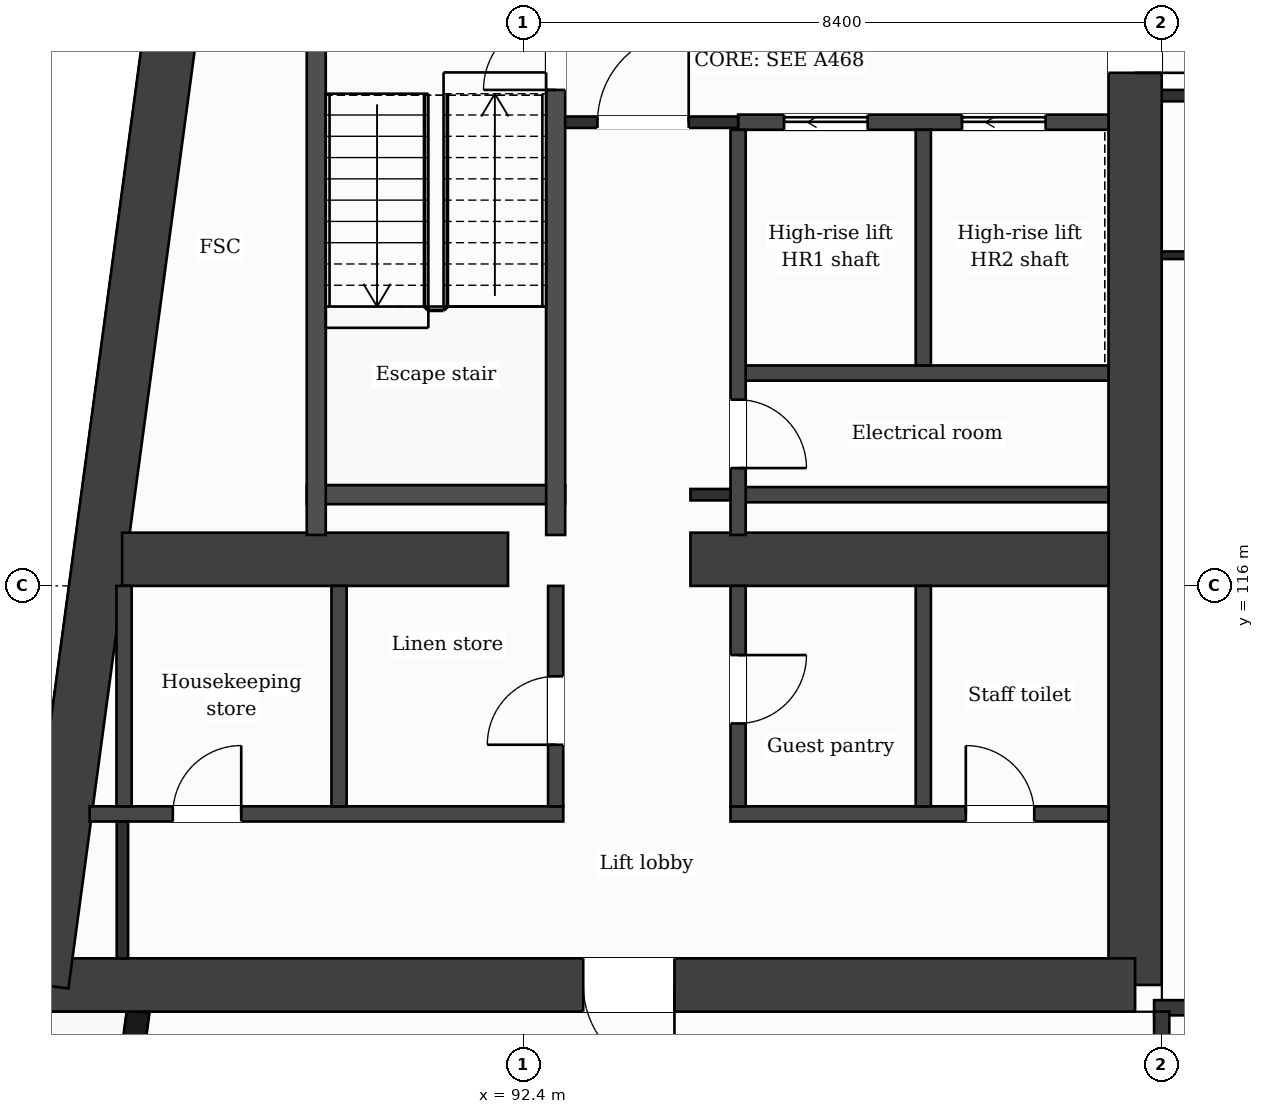
"""IFC4 building model, lengths in metres.
Left out: names, types, materials, properties, quantities, classifications, styles, units other than length and angle.
Written with IfcOpenShell. Run it as: python <this file> out.ifc"""

import sys

from ifc_helpers import new_model, si_unit, direction, frame, frame_2d, origin, place, context, subcontext, project, spatial, rectangle, extrude, element, fill, save


model = new_model("IFC4")
c1 = context("Model", 3, precision=1e-05, world=origin(), true_north=direction((0.0, 1.0)))
c2 = subcontext(c1, "Body", "Model", "MODEL_VIEW")
j1 = project(units=[si_unit("LENGTHUNIT", "METRE"), si_unit("PLANEANGLEUNIT", "RADIAN")], contexts=[c1])
p1 = place(None, origin())
s1 = spatial("IfcSite", under=j1, at=p1, CompositionType="ELEMENT")
p2 = place(p1, origin())
s2 = spatial("IfcBuilding", under=s1, at=p2, CompositionType="ELEMENT")
p3 = place(p2, frame((0.0, 0.0, 277.5)))
s3 = spatial("IfcBuildingStorey", under=s2, at=p3, CompositionType="ELEMENT", Elevation=277.5)
p4 = place(p3, frame((100.45, 132.05, 0.0), z_axis=(0.0, 0.0, 1.0), x_axis=(0.0, -1.0, 0.0)))
e1 = element("IfcWall", 1, at=p4, inside=s3, PredefinedType="SHEAR", context=c2, shape_type="SweptSolid", body=[
    extrude(rectangle(XDim=21.3, YDim=0.7, at=frame_2d((10.65, 0.0))), origin(), (0.0, 0.0, 1.0), 3.7),
])
p5 = place(p4, frame((7.9, 0.0, 0.0)))
e2 = element("IfcOpeningElement", 2, at=p5, cuts=e1, PredefinedType="OPENING", context=c2, shape_type="SweptSolid", body=[
    extrude(rectangle(XDim=1.4, YDim=2.1, at=frame_2d((0.7, 1.05))), frame((0.0, 0.36, 0.0), z_axis=(0.0, -1.0, 0.0), x_axis=(1.0, 0.0, 0.0)), (0.0, 0.0, 1.0), 0.72),
])
p6 = place(p3, frame((100.45, 110.75, 0.0), z_axis=(0.0, 0.0, 1.0), x_axis=(-1.0, 0.0, 0.0)))
e3 = element("IfcWall", 3, at=p6, inside=s3, PredefinedType="SHEAR", context=c2, shape_type="SweptSolid", body=[
    extrude(rectangle(XDim=14.38, YDim=0.7, at=frame_2d((7.19, 0.0))), origin(), (0.0, 0.0, 1.0), 3.7),
])
p7 = place(p6, frame((6.06, 0.0, 0.0)))
e4 = element("IfcOpeningElement", 4, at=p7, cuts=e3, PredefinedType="OPENING", context=c2, shape_type="SweptSolid", body=[
    extrude(rectangle(XDim=1.2, YDim=2.1, at=frame_2d((0.6, 1.05))), frame((0.0, 0.36, 0.0), z_axis=(0.0, -1.0, 0.0), x_axis=(1.0, 0.0, 0.0)), (0.0, 0.0, 1.0), 0.72),
])
p8 = place(p3, frame((86.07, 110.75, 0.0), z_axis=(0.0, 0.0, 1.0), x_axis=(0.133406218907, 0.991061441464, 0.0)))
e5 = element("IfcWall", 5, at=p8, inside=s3, PredefinedType="SHEAR", context=c2, shape_type="SweptSolid", body=[
    extrude(rectangle(XDim=21.492, YDim=0.7, at=frame_2d((10.746, 0.0))), origin(), (0.0, 0.0, 1.0), 3.7),
])
p9 = place(p3, frame((87.123, 116.35, 0.0), z_axis=(0.0, 0.0, 1.0), x_axis=(1.0, 0.0, 0.0)))
e6 = element("IfcWall", 6, at=p9, inside=s3, PredefinedType="SHEAR", context=c2, shape_type="SweptSolid", body=[
    extrude(rectangle(XDim=5.077, YDim=0.7, at=frame_2d((2.539, 0.0))), origin(), (0.0, 0.0, 1.0), 3.7),
])
p10 = place(p3, frame((94.6, 116.35, 0.0), z_axis=(0.0, 0.0, 1.0), x_axis=(1.0, 0.0, 0.0)))
e7 = element("IfcWall", 7, at=p10, inside=s3, PredefinedType="SHEAR", context=c2, shape_type="SweptSolid", body=[
    extrude(rectangle(XDim=5.5, YDim=0.7, at=frame_2d((2.75, 0.0))), origin(), (0.0, 0.0, 1.0), 3.7),
])
p11 = place(p3, frame((87.334, 110.4, 0.0), z_axis=(0.0, 0.0, 1.0), x_axis=(-0.13345962011, -0.991054251694, 0.0)))
e8 = element("IfcWall", 8, at=p11, inside=s3, PredefinedType="SOLIDWALL", context=c2, shape_type="SweptSolid", body=[
    extrude(rectangle(XDim=1.937, YDim=0.3, at=frame_2d((0.969, 0.0))), origin(), (0.0, 0.0, 1.0), 3.38),
])
p12 = place(p3, frame((100.7, 110.45, 0.0), z_axis=(0.0, 0.0, 1.0), x_axis=(1.0, 0.0, 0.0)))
e9 = element("IfcWall", 9, at=p12, inside=s3, PredefinedType="PARTITIONING", context=c2, shape_type="SweptSolid", body=[
    extrude(rectangle(XDim=25.4, YDim=0.2, at=frame_2d((12.7, 0.0))), origin(), (0.0, 0.0, 1.0), 3.38),
])
p13 = place(p3, frame((86.696, 113.0, 0.0), z_axis=(0.0, 0.0, 1.0), x_axis=(1.0, 0.0, 0.0)))
e10 = element("IfcWall", 10, at=p13, inside=s3, PredefinedType="PARTITIONING", context=c2, shape_type="SweptSolid", body=[
    extrude(rectangle(XDim=6.231, YDim=0.2, at=frame_2d((3.116, 0.0))), origin(), (0.0, 0.0, 1.0), 3.38),
])
p14 = place(p13, frame((1.094, 0.0, 0.0)))
e11 = element("IfcOpeningElement", 11, at=p14, cuts=e10, PredefinedType="OPENING", context=c2, shape_type="SweptSolid", body=[
    extrude(rectangle(XDim=0.9, YDim=2.1, at=frame_2d((0.45, 1.05))), frame((0.0, 0.11, 0.0), z_axis=(0.0, -1.0, 0.0), x_axis=(1.0, 0.0, 0.0)), (0.0, 0.0, 1.0), 0.22),
])
p15 = place(p3, frame((95.127, 113.0, 0.0), z_axis=(0.0, 0.0, 1.0), x_axis=(1.0, 0.0, 0.0)))
e12 = element("IfcWall", 12, at=p15, inside=s3, PredefinedType="PARTITIONING", context=c2, shape_type="SweptSolid", body=[
    extrude(rectangle(XDim=4.973, YDim=0.2, at=frame_2d((2.487, 0.0))), origin(), (0.0, 0.0, 1.0), 3.38),
])
p16 = place(p15, frame((3.096, 0.0, 0.0)))
e13 = element("IfcOpeningElement", 13, at=p16, cuts=e12, PredefinedType="OPENING", context=c2, shape_type="SweptSolid", body=[
    extrude(rectangle(XDim=0.9, YDim=2.1, at=frame_2d((0.45, 1.05))), frame((0.0, 0.11, 0.0), z_axis=(0.0, -1.0, 0.0), x_axis=(1.0, 0.0, 0.0)), (0.0, 0.0, 1.0), 0.22),
])
p17 = place(p3, frame((95.227, 117.2, 0.0), z_axis=(0.0, 0.0, 1.0), x_axis=(1.0, 0.0, 0.0)))
e14 = element("IfcWall", 14, at=p17, inside=s3, PredefinedType="PARTITIONING", context=c2, shape_type="SweptSolid", body=[
    extrude(rectangle(XDim=4.873, YDim=0.2, at=frame_2d((2.437, 0.0))), origin(), (0.0, 0.0, 1.0), 3.38),
])
p18 = place(p3, frame((94.6, 117.2, 0.0), z_axis=(0.0, 0.0, 1.0), x_axis=(1.0, 0.0, 0.0)))
e15 = element("IfcWall", 15, at=p18, inside=s3, PredefinedType="PARTITIONING", context=c2, shape_type="SweptSolid", body=[
    extrude(rectangle(XDim=0.627, YDim=0.15, at=frame_2d((0.313, 0.0))), origin(), (0.0, 0.0, 1.0), 3.38),
])
p19 = place(p3, frame((89.552, 117.2, 0.0), z_axis=(0.0, 0.0, 1.0), x_axis=(1.0, 0.0, 0.0)))
e16 = element("IfcWall", 16, at=p19, inside=s3, PredefinedType="PARTITIONING", context=c2, shape_type="SweptSolid", body=[
    extrude(rectangle(XDim=3.4, YDim=0.25, at=frame_2d((1.7, 0.0))), origin(), (0.0, 0.0, 1.0), 3.38),
])
p20 = place(p3, frame((95.227, 118.8, 0.0), z_axis=(0.0, 0.0, 1.0), x_axis=(1.0, 0.0, 0.0)))
e17 = element("IfcWall", 17, at=p20, inside=s3, PredefinedType="PARTITIONING", context=c2, shape_type="SweptSolid", body=[
    extrude(rectangle(XDim=4.873, YDim=0.2, at=frame_2d((2.437, 0.0))), origin(), (0.0, 0.0, 1.0), 3.38),
])
p21 = place(p3, frame((100.8, 120.35, 0.0), z_axis=(0.0, 0.0, 1.0), x_axis=(1.0, 0.0, 0.0)))
e18 = element("IfcWall", 18, at=p21, inside=s3, PredefinedType="PARTITIONING", context=c2, shape_type="SweptSolid", body=[
    extrude(rectangle(XDim=2.75, YDim=0.1, at=frame_2d((1.375, 0.0))), origin(), (0.0, 0.0, 1.0), 3.38),
])
p22 = place(p21, frame((1.07, 0.0, 0.0)))
e19 = element("IfcOpeningElement", 19, at=p22, cuts=e18, PredefinedType="OPENING", context=c2, shape_type="SweptSolid", body=[
    extrude(rectangle(XDim=0.8, YDim=2.1, at=frame_2d((0.4, 1.05))), frame((0.0, 0.06, 0.0), z_axis=(0.0, -1.0, 0.0), x_axis=(1.0, 0.0, 0.0)), (0.0, 0.0, 1.0), 0.12),
])
p23 = place(p3, frame((95.227, 122.1, 0.0), z_axis=(0.0, 0.0, 1.0), x_axis=(1.0, 0.0, 0.0)))
e20 = element("IfcWall", 20, at=p23, inside=s3, PredefinedType="PARTITIONING", context=c2, shape_type="SweptSolid", body=[
    extrude(rectangle(XDim=4.873, YDim=0.2, at=frame_2d((2.437, 0.0))), origin(), (0.0, 0.0, 1.0), 3.38),
])
p24 = place(p23, frame((0.605, 0.0, 0.0)))
e21 = element("IfcOpeningElement", 21, at=p24, cuts=e20, PredefinedType="OPENING", context=c2, shape_type="SweptSolid", body=[
    extrude(rectangle(XDim=1.1, YDim=2.1, at=frame_2d((0.55, 1.05))), frame((0.0, 0.11, 0.0), z_axis=(0.0, -1.0, 0.0), x_axis=(1.0, 0.0, 0.0)), (0.0, 0.0, 1.0), 0.22),
])
p25 = place(p23, frame((2.946, 0.0, 0.0)))
e22 = element("IfcOpeningElement", 22, at=p25, cuts=e20, PredefinedType="OPENING", context=c2, shape_type="SweptSolid", body=[
    extrude(rectangle(XDim=1.1, YDim=2.1, at=frame_2d((0.55, 1.05))), frame((0.0, 0.11, 0.0), z_axis=(0.0, -1.0, 0.0), x_axis=(1.0, 0.0, 0.0)), (0.0, 0.0, 1.0), 0.22),
])
p26 = place(p3, frame((92.827, 122.1, 0.0), z_axis=(0.0, 0.0, 1.0), x_axis=(1.0, 0.0, 0.0)))
e23 = element("IfcWall", 23, at=p26, inside=s3, PredefinedType="PARTITIONING", context=c2, shape_type="SweptSolid", body=[
    extrude(rectangle(XDim=2.4, YDim=0.15, at=frame_2d((1.2, 0.0))), origin(), (0.0, 0.0, 1.0), 3.38),
])
p27 = place(p26, frame((0.55, 0.0, 0.0)))
e24 = element("IfcOpeningElement", 24, at=p27, cuts=e23, PredefinedType="OPENING", context=c2, shape_type="SweptSolid", body=[
    extrude(rectangle(XDim=1.2, YDim=2.1, at=frame_2d((0.6, 1.05))), frame((0.0, 0.085, 0.0), z_axis=(0.0, -1.0, 0.0), x_axis=(1.0, 0.0, 0.0)), (0.0, 0.0, 1.0), 0.17),
])
p28 = place(p3, frame((100.8, 122.45, 0.0), z_axis=(0.0, 0.0, 1.0), x_axis=(1.0, 0.0, 0.0)))
e25 = element("IfcWall", 25, at=p28, inside=s3, PredefinedType="PARTITIONING", context=c2, shape_type="SweptSolid", body=[
    extrude(rectangle(XDim=25.2, YDim=0.15, at=frame_2d((12.6, 0.0))), origin(), (0.0, 0.0, 1.0), 3.38),
])
p29 = place(p28, frame((5.55, 0.0, 0.0)))
e26 = element("IfcOpeningElement", 26, at=p29, cuts=e25, PredefinedType="OPENING", context=c2, shape_type="SweptSolid", body=[
    extrude(rectangle(XDim=1.0, YDim=2.1, at=frame_2d((0.5, 1.05))), frame((0.0, 0.085, 0.0), z_axis=(0.0, -1.0, 0.0), x_axis=(1.0, 0.0, 0.0)), (0.0, 0.0, 1.0), 0.17),
])
p30 = place(p28, frame((8.862, 0.0, 0.0)))
e27 = element("IfcOpeningElement", 27, at=p30, cuts=e25, PredefinedType="OPENING", context=c2, shape_type="SweptSolid", body=[
    extrude(rectangle(XDim=0.95, YDim=2.1, at=frame_2d((0.475, 1.05))), frame((0.0, 0.085, 0.0), z_axis=(0.0, -1.0, 0.0), x_axis=(1.0, 0.0, 0.0)), (0.0, 0.0, 1.0), 0.17),
])
p31 = place(p28, frame((15.2, 0.0, 0.0)))
e28 = element("IfcOpeningElement", 28, at=p31, cuts=e25, PredefinedType="OPENING", context=c2, shape_type="SweptSolid", body=[
    extrude(rectangle(XDim=0.95, YDim=2.1, at=frame_2d((0.475, 1.05))), frame((0.0, 0.085, 0.0), z_axis=(0.0, -1.0, 0.0), x_axis=(1.0, 0.0, 0.0)), (0.0, 0.0, 1.0), 0.17),
])
p32 = place(p28, frame((17.325, 0.0, 0.0)))
e29 = element("IfcOpeningElement", 29, at=p32, cuts=e25, PredefinedType="OPENING", context=c2, shape_type="SweptSolid", body=[
    extrude(rectangle(XDim=1.0, YDim=2.1, at=frame_2d((0.5, 1.05))), frame((0.0, 0.085, 0.0), z_axis=(0.0, -1.0, 0.0), x_axis=(1.0, 0.0, 0.0)), (0.0, 0.0, 1.0), 0.17),
])
p33 = place(p28, frame((23.862, 0.0, 0.0)))
e30 = element("IfcOpeningElement", 30, at=p33, cuts=e25, PredefinedType="OPENING", context=c2, shape_type="SweptSolid", body=[
    extrude(rectangle(XDim=0.95, YDim=2.1, at=frame_2d((0.475, 1.05))), frame((0.0, 0.085, 0.0), z_axis=(0.0, -1.0, 0.0), x_axis=(1.0, 0.0, 0.0)), (0.0, 0.0, 1.0), 0.17),
])
p34 = place(p3, frame((87.148, 113.1, 0.0), z_axis=(0.0, 0.0, 1.0), x_axis=(0.0, 1.0, 0.0)))
e31 = element("IfcWall", 31, at=p34, inside=s3, PredefinedType="PARTITIONING", context=c2, shape_type="SweptSolid", body=[
    extrude(rectangle(XDim=2.9, YDim=0.2, at=frame_2d((1.45, 0.0))), origin(), (0.0, 0.0, 1.0), 3.38),
])
p35 = place(p3, frame((87.127, 111.1, 0.0), z_axis=(0.0, 0.0, 1.0), x_axis=(0.0, 1.0, 0.0)))
e32 = element("IfcWall", 32, at=p35, inside=s3, PredefinedType="PARTITIONING", context=c2, shape_type="SweptSolid", body=[
    extrude(rectangle(XDim=1.8, YDim=0.15, at=frame_2d((0.9, 0.0))), origin(), (0.0, 0.0, 1.0), 3.38),
])
p36 = place(p3, frame((89.677, 116.67, 0.0), z_axis=(0.0, 0.0, 1.0), x_axis=(0.0, 1.0, 0.0)))
e33 = element("IfcWall", 33, at=p36, inside=s3, PredefinedType="PARTITIONING", context=c2, shape_type="SweptSolid", body=[
    extrude(rectangle(XDim=7.155, YDim=0.25, at=frame_2d((3.578, 0.0))), origin(), (0.0, 0.0, 1.0), 3.38),
])
p37 = place(p3, frame((89.977, 113.1, 0.0), z_axis=(0.0, 0.0, 1.0), x_axis=(0.0, 1.0, 0.0)))
e34 = element("IfcWall", 34, at=p37, inside=s3, PredefinedType="PARTITIONING", context=c2, shape_type="SweptSolid", body=[
    extrude(rectangle(XDim=2.9, YDim=0.2, at=frame_2d((1.45, 0.0))), origin(), (0.0, 0.0, 1.0), 3.38),
])
p38 = place(p3, frame((92.827, 113.1, 0.0), z_axis=(0.0, 0.0, 1.0), x_axis=(0.0, 1.0, 0.0)))
e35 = element("IfcWall", 35, at=p38, inside=s3, PredefinedType="PARTITIONING", context=c2, shape_type="SweptSolid", body=[
    extrude(rectangle(XDim=2.9, YDim=0.2, at=frame_2d((1.45, 0.0))), origin(), (0.0, 0.0, 1.0), 3.38),
])
p39 = place(p38, frame((0.81, 0.0, 0.0)))
e36 = element("IfcOpeningElement", 36, at=p39, cuts=e35, PredefinedType="OPENING", context=c2, shape_type="SweptSolid", body=[
    extrude(rectangle(XDim=0.9, YDim=2.1, at=frame_2d((0.45, 1.05))), frame((0.0, 0.11, 0.0), z_axis=(0.0, -1.0, 0.0), x_axis=(1.0, 0.0, 0.0)), (0.0, 0.0, 1.0), 0.22),
])
p40 = place(p3, frame((92.827, 116.67, 0.0), z_axis=(0.0, 0.0, 1.0), x_axis=(0.0, 1.0, 0.0)))
e37 = element("IfcWall", 37, at=p40, inside=s3, PredefinedType="PARTITIONING", context=c2, shape_type="SweptSolid", body=[
    extrude(rectangle(XDim=7.155, YDim=0.25, at=frame_2d((3.578, 0.0))), origin(), (0.0, 0.0, 1.0), 3.38),
])
p41 = place(p40, frame((5.855, 0.0, 0.0)))
e38 = element("IfcOpeningElement", 38, at=p41, cuts=e37, PredefinedType="OPENING", context=c2, shape_type="SweptSolid", body=[
    extrude(rectangle(XDim=0.95, YDim=2.1, at=frame_2d((0.475, 1.05))), frame((0.0, 0.135, 0.0), z_axis=(0.0, -1.0, 0.0), x_axis=(1.0, 0.0, 0.0)), (0.0, 0.0, 1.0), 0.27),
])
p42 = place(p3, frame((95.227, 113.1, 0.0), z_axis=(0.0, 0.0, 1.0), x_axis=(0.0, 1.0, 0.0)))
e39 = element("IfcWall", 39, at=p42, inside=s3, PredefinedType="PARTITIONING", context=c2, shape_type="SweptSolid", body=[
    extrude(rectangle(XDim=2.9, YDim=0.2, at=frame_2d((1.45, 0.0))), origin(), (0.0, 0.0, 1.0), 3.38),
])
p43 = place(p42, frame((1.09, 0.0, 0.0)))
e40 = element("IfcOpeningElement", 40, at=p43, cuts=e39, PredefinedType="OPENING", context=c2, shape_type="SweptSolid", body=[
    extrude(rectangle(XDim=0.9, YDim=2.1, at=frame_2d((0.45, 1.05))), frame((0.0, 0.11, 0.0), z_axis=(0.0, -1.0, 0.0), x_axis=(1.0, 0.0, 0.0)), (0.0, 0.0, 1.0), 0.22),
])
p44 = place(p3, frame((95.227, 116.67, 0.0), z_axis=(0.0, 0.0, 1.0), x_axis=(0.0, 1.0, 0.0)))
e41 = element("IfcWall", 41, at=p44, inside=s3, PredefinedType="PARTITIONING", context=c2, shape_type="SweptSolid", body=[
    extrude(rectangle(XDim=5.33, YDim=0.2, at=frame_2d((2.665, 0.0))), origin(), (0.0, 0.0, 1.0), 3.38),
])
p45 = place(p44, frame((0.88, 0.0, 0.0)))
e42 = element("IfcOpeningElement", 42, at=p45, cuts=e41, PredefinedType="OPENING", context=c2, shape_type="SweptSolid", body=[
    extrude(rectangle(XDim=0.9, YDim=2.1, at=frame_2d((0.45, 1.05))), frame((0.0, 0.11, 0.0), z_axis=(0.0, -1.0, 0.0), x_axis=(1.0, 0.0, 0.0)), (0.0, 0.0, 1.0), 0.22),
])
p46 = place(p3, frame((97.664, 113.1, 0.0), z_axis=(0.0, 0.0, 1.0), x_axis=(0.0, 1.0, 0.0)))
e43 = element("IfcWall", 43, at=p46, inside=s3, PredefinedType="PARTITIONING", context=c2, shape_type="SweptSolid", body=[
    extrude(rectangle(XDim=2.9, YDim=0.2, at=frame_2d((1.45, 0.0))), origin(), (0.0, 0.0, 1.0), 3.38),
])
p47 = place(p3, frame((97.664, 118.9, 0.0), z_axis=(0.0, 0.0, 1.0), x_axis=(0.0, 1.0, 0.0)))
e44 = element("IfcWall", 44, at=p47, inside=s3, PredefinedType="PARTITIONING", context=c2, shape_type="SweptSolid", body=[
    extrude(rectangle(XDim=3.1, YDim=0.2, at=frame_2d((1.55, 0.0))), origin(), (0.0, 0.0, 1.0), 3.38),
])
p48 = place(p3, frame((100.8, 108.79, 0.0), z_axis=(0.0, 0.0, 1.0), x_axis=(0.0, 1.0, 0.0)))
e45 = element("IfcWall", 45, at=p48, inside=s3, PredefinedType="PARTITIONING", context=c2, shape_type="SweptSolid", body=[
    extrude(rectangle(XDim=1.61, YDim=0.2, at=frame_2d((0.805, 0.0))), origin(), (0.0, 0.0, 1.0), 3.38),
])
p49 = place(p27, origin())
e46 = element("IfcDoor", 46, at=p49, inside=s3, OperationType="SINGLE_SWING_RIGHT", PredefinedType="DOOR", context=c2, shape_type="SweptSolid", body=[
    extrude(rectangle(XDim=1.2, YDim=2.1, at=frame_2d((0.6, 1.05))), frame((0.0, 0.025, 0.0), z_axis=(0.0, -1.0, 0.0), x_axis=(1.0, 0.0, 0.0)), (0.0, 0.0, 1.0), 0.05),
])
fill(e24, e46)
p50 = place(p24, origin())
e47 = element("IfcDoor", 47, at=p50, inside=s3, OperationType="SLIDING_TO_LEFT", PredefinedType="DOOR", context=c2, shape_type="SweptSolid", body=[
    extrude(rectangle(XDim=1.1, YDim=2.1, at=frame_2d((0.55, 1.05))), frame((0.0, 0.025, 0.0), z_axis=(0.0, -1.0, 0.0), x_axis=(1.0, 0.0, 0.0)), (0.0, 0.0, 1.0), 0.05),
])
fill(e21, e47)
p51 = place(p25, origin())
e48 = element("IfcDoor", 48, at=p51, inside=s3, OperationType="SLIDING_TO_LEFT", PredefinedType="DOOR", context=c2, shape_type="SweptSolid", body=[
    extrude(rectangle(XDim=1.1, YDim=2.1, at=frame_2d((0.55, 1.05))), frame((0.0, 0.025, 0.0), z_axis=(0.0, -1.0, 0.0), x_axis=(1.0, 0.0, 0.0)), (0.0, 0.0, 1.0), 0.05),
])
fill(e22, e48)
p52 = place(p41, origin())
e49 = element("IfcDoor", 49, at=p52, inside=s3, OperationType="SINGLE_SWING_LEFT", PredefinedType="DOOR", context=c2, shape_type="SweptSolid", body=[
    extrude(rectangle(XDim=0.95, YDim=2.1, at=frame_2d((0.475, 1.05))), frame((0.0, 0.025, 0.0), z_axis=(0.0, -1.0, 0.0), x_axis=(1.0, 0.0, 0.0)), (0.0, 0.0, 1.0), 0.05),
])
fill(e38, e49)
p53 = place(p45, origin())
e50 = element("IfcDoor", 50, at=p53, inside=s3, OperationType="SINGLE_SWING_LEFT", PredefinedType="DOOR", context=c2, shape_type="SweptSolid", body=[
    extrude(rectangle(XDim=0.9, YDim=2.1, at=frame_2d((0.45, 1.05))), frame((0.0, 0.025, 0.0), z_axis=(0.0, -1.0, 0.0), x_axis=(1.0, 0.0, 0.0)), (0.0, 0.0, 1.0), 0.05),
])
fill(e42, e50)
p54 = place(p14, origin())
e51 = element("IfcDoor", 51, at=p54, inside=s3, OperationType="SINGLE_SWING_RIGHT", PredefinedType="DOOR", context=c2, shape_type="SweptSolid", body=[
    extrude(rectangle(XDim=0.9, YDim=2.1, at=frame_2d((0.45, 1.05))), frame((0.0, 0.025, 0.0), z_axis=(0.0, -1.0, 0.0), x_axis=(1.0, 0.0, 0.0)), (0.0, 0.0, 1.0), 0.05),
])
fill(e11, e51)
p55 = place(p39, origin())
e52 = element("IfcDoor", 52, at=p55, inside=s3, OperationType="SINGLE_SWING_LEFT", PredefinedType="DOOR", context=c2, shape_type="SweptSolid", body=[
    extrude(rectangle(XDim=0.9, YDim=2.1, at=frame_2d((0.45, 1.05))), frame((0.0, 0.025, 0.0), z_axis=(0.0, -1.0, 0.0), x_axis=(1.0, 0.0, 0.0)), (0.0, 0.0, 1.0), 0.05),
])
fill(e36, e52)
p56 = place(p43, origin())
e53 = element("IfcDoor", 53, at=p56, inside=s3, OperationType="SINGLE_SWING_RIGHT", PredefinedType="DOOR", context=c2, shape_type="SweptSolid", body=[
    extrude(rectangle(XDim=0.9, YDim=2.1, at=frame_2d((0.45, 1.05))), frame((0.0, 0.025, 0.0), z_axis=(0.0, -1.0, 0.0), x_axis=(1.0, 0.0, 0.0)), (0.0, 0.0, 1.0), 0.05),
])
fill(e40, e53)
p57 = place(p16, origin())
e54 = element("IfcDoor", 54, at=p57, inside=s3, OperationType="SINGLE_SWING_LEFT", PredefinedType="DOOR", context=c2, shape_type="SweptSolid", body=[
    extrude(rectangle(XDim=0.9, YDim=2.1, at=frame_2d((0.45, 1.05))), frame((0.0, 0.025, 0.0), z_axis=(0.0, -1.0, 0.0), x_axis=(1.0, 0.0, 0.0)), (0.0, 0.0, 1.0), 0.05),
])
fill(e13, e54)
p58 = place(p7, origin())
e55 = element("IfcDoor", 55, at=p58, inside=s3, OperationType="SINGLE_SWING_LEFT", PredefinedType="DOOR", context=c2, shape_type="SweptSolid", body=[
    extrude(rectangle(XDim=1.2, YDim=2.1, at=frame_2d((0.6, 1.05))), frame((0.0, 0.025, 0.0), z_axis=(0.0, -1.0, 0.0), x_axis=(1.0, 0.0, 0.0)), (0.0, 0.0, 1.0), 0.05),
])
fill(e4, e55)
p59 = place(p5, origin())
e56 = element("IfcDoor", 56, at=p59, inside=s3, OperationType="SINGLE_SWING_RIGHT", PredefinedType="DOOR", context=c2, shape_type="SweptSolid", body=[
    extrude(rectangle(XDim=1.4, YDim=2.1, at=frame_2d((0.7, 1.05))), frame((0.0, 0.025, 0.0), z_axis=(0.0, -1.0, 0.0), x_axis=(1.0, 0.0, 0.0)), (0.0, 0.0, 1.0), 0.05),
])
fill(e2, e56)
save(model, sys.argv[1])
